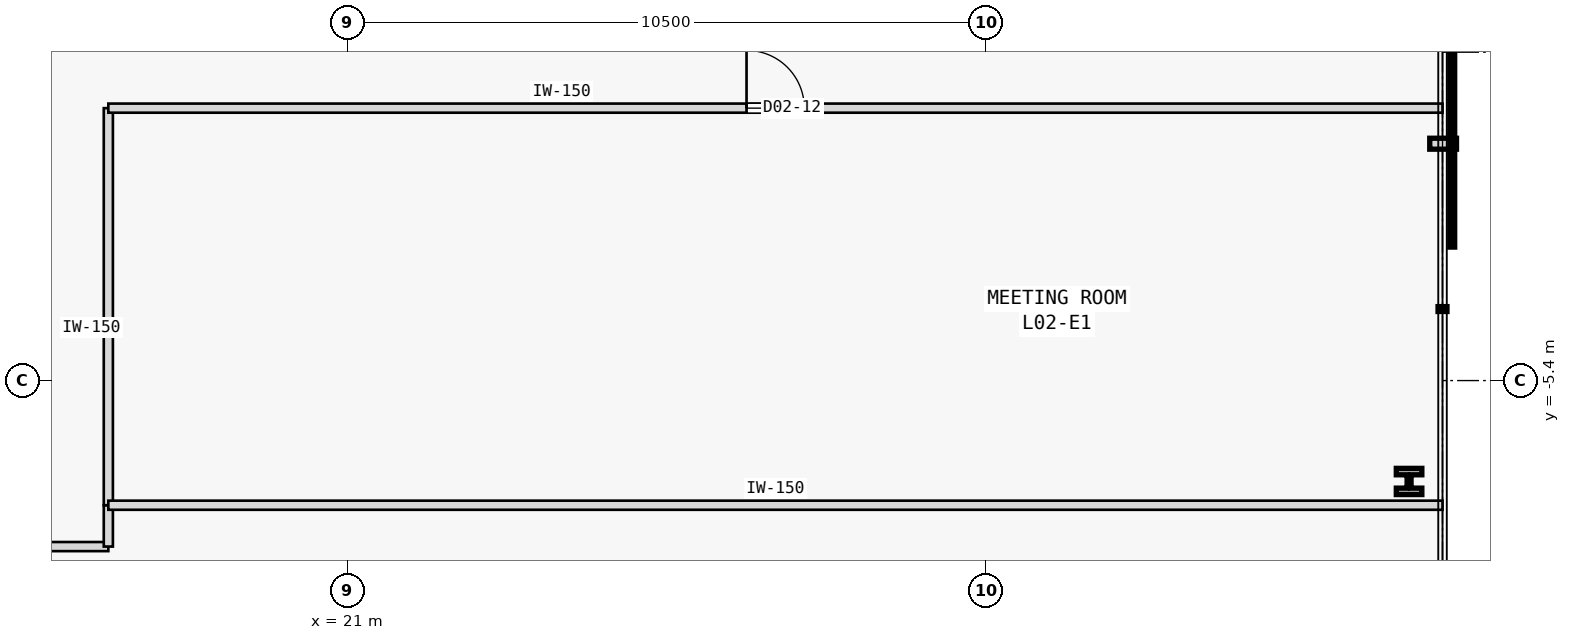
"""IFC4 building model, lengths in metres.
Left out: names, types, materials, properties, quantities, classifications, styles, units other than length and angle.
Written with IfcOpenShell. Run it as: python <this file> out.ifc"""

import sys

from ifc_helpers import new_model, si_unit, direction, frame, frame_2d, origin, origin_2d, place, context, subcontext, project, spatial, rectangle, i_section, extrude, element, fill, save


model = new_model("IFC4")
c1 = context("Model", 3, precision=1e-05, world=origin(), true_north=direction((0.0, 1.0)))
c2 = subcontext(c1, "Body", "Model", "MODEL_VIEW")
j1 = project(units=[si_unit("LENGTHUNIT", "METRE"), si_unit("PLANEANGLEUNIT", "RADIAN")], contexts=[c1])
p1 = place(None, origin())
s1 = spatial("IfcSite", under=j1, at=p1, CompositionType="ELEMENT")
p2 = place(p1, origin())
s2 = spatial("IfcBuilding", under=s1, at=p2, CompositionType="ELEMENT")
p3 = place(p2, frame((0.0, 0.0, 14.2)))
s3 = spatial("IfcBuildingStorey", under=s2, at=p3, CompositionType="ELEMENT", Elevation=14.2)
p4 = place(p3, frame((38.45, -7.059, 0.0), z_axis=(0.0, 0.0, 1.0), x_axis=(1.0, 0.0, 0.0)))
e1 = element("IfcColumn", 1, at=p4, inside=s3, PredefinedType="COLUMN", context=c2, shape_type="SweptSolid", body=[
    extrude(i_section(OverallWidth=0.42, OverallDepth=0.431, WebThickness=0.065, FlangeThickness=0.106, FilletRadius=0.015, at=origin_2d()), origin(), (0.0, 0.0, 1.0), 3.8),
])
p5 = place(p3, frame((0.92, -8.13, 0.0), z_axis=(0.0, 0.0, 1.0), x_axis=(1.0, 0.0, 0.0)))
e2 = element("IfcWall", 2, at=p5, inside=s3, PredefinedType="PARTITIONING", context=c2, shape_type="SweptSolid", body=[
    extrude(rectangle(XDim=16.139, YDim=0.15, at=frame_2d((8.07, 0.0))), origin(), (0.0, 0.0, 1.0), 3.575),
])
p6 = place(p3, frame((17.059, -8.13, 0.0), z_axis=(0.0, 0.0, 1.0), x_axis=(0.0, 1.0, 0.0)))
e3 = element("IfcWall", 3, at=p6, inside=s3, PredefinedType="PARTITIONING", context=c2, shape_type="SweptSolid", body=[
    extrude(rectangle(XDim=0.68, YDim=0.15, at=frame_2d((0.34, 0.0))), origin(), (0.0, 0.0, 1.0), 3.575),
])
p7 = place(p3, frame((17.059, -7.45, 0.0), z_axis=(0.0, 0.0, 1.0), x_axis=(0.0, 1.0, 0.0)))
e4 = element("IfcWall", 4, at=p7, inside=s3, PredefinedType="PARTITIONING", context=c2, shape_type="SweptSolid", body=[
    extrude(rectangle(XDim=6.53, YDim=0.15, at=frame_2d((3.265, 0.0))), origin(), (0.0, 0.0, 1.0), 3.575),
])
p8 = place(p3, frame((17.059, -0.92, 0.0), z_axis=(0.0, 0.0, 1.0), x_axis=(1.0, 0.0, 0.0)))
e5 = element("IfcWall", 5, at=p8, inside=s3, PredefinedType="PARTITIONING", context=c2, shape_type="SweptSolid", body=[
    extrude(rectangle(XDim=21.941, YDim=0.15, at=frame_2d((10.97, 0.0))), origin(), (0.0, 0.0, 1.0), 3.575),
])
p9 = place(p8, frame((10.496, 0.0, 0.0)))
e6 = element("IfcOpeningElement", 6, at=p9, cuts=e5, PredefinedType="OPENING", context=c2, shape_type="SweptSolid", body=[
    extrude(rectangle(XDim=0.95, YDim=2.15, at=frame_2d((0.475, 1.075))), frame((0.0, 0.085, 0.0), z_axis=(0.0, -1.0, 0.0), x_axis=(1.0, 0.0, 0.0)), (0.0, 0.0, 1.0), 0.17),
])
p10 = place(p3, frame((17.059, -7.45, 0.0), z_axis=(0.0, 0.0, 1.0), x_axis=(1.0, 0.0, 0.0)))
e7 = element("IfcWall", 7, at=p10, inside=s3, PredefinedType="PARTITIONING", context=c2, shape_type="SweptSolid", body=[
    extrude(rectangle(XDim=21.941, YDim=0.15, at=frame_2d((10.97, 0.0))), origin(), (0.0, 0.0, 1.0), 3.575),
])
p11 = place(p9, origin())
e8 = element("IfcDoor", 8, at=p11, inside=s3, OperationType="SINGLE_SWING_LEFT", PredefinedType="DOOR", context=c2, shape_type="SweptSolid", body=[
    extrude(rectangle(XDim=0.95, YDim=2.15, at=frame_2d((0.475, 1.075))), frame((0.0, 0.025, 0.0), z_axis=(0.0, -1.0, 0.0), x_axis=(1.0, 0.0, 0.0)), (0.0, 0.0, 1.0), 0.05),
])
fill(e6, e8)
save(model, sys.argv[1])
